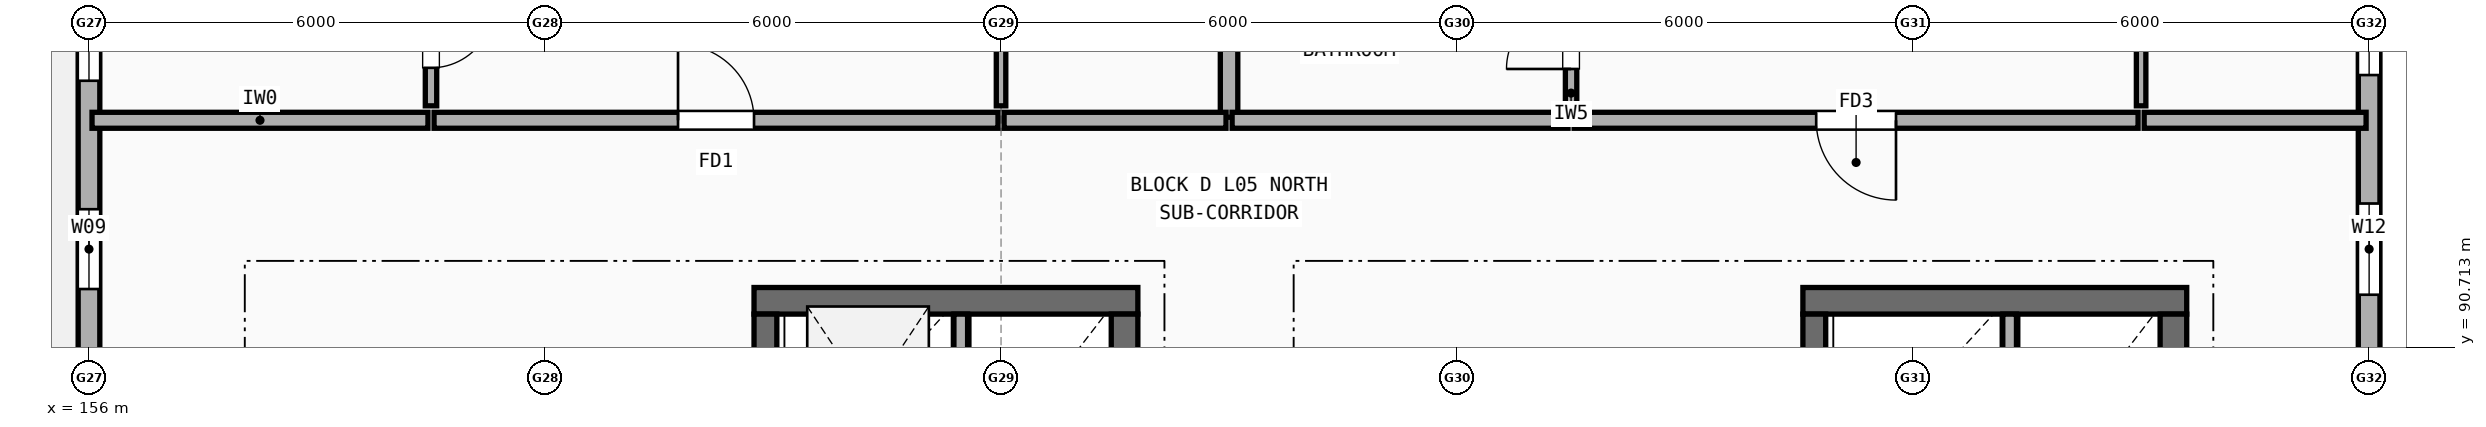
"""IFC4 building model, lengths in metres.
Left out: names, types, materials, properties, quantities, classifications, styles, units other than length and angle.
Written with IfcOpenShell. Run it as: python <this file> out.ifc"""

import sys

from ifc_helpers import new_model, si_unit, direction, frame, frame_2d, origin, place, context, subcontext, project, spatial, rectangle, extrude, element, fill, save


model = new_model("IFC4")
c1 = context("Model", 3, precision=1e-05, world=origin(), true_north=direction((0.0, 1.0)))
c2 = subcontext(c1, "Body", "Model", "MODEL_VIEW")
j1 = project(units=[si_unit("LENGTHUNIT", "METRE"), si_unit("PLANEANGLEUNIT", "RADIAN")], contexts=[c1])
p1 = place(None, origin())
s1 = spatial("IfcSite", under=j1, at=p1, CompositionType="ELEMENT")
p2 = place(p1, origin())
s2 = spatial("IfcBuilding", under=s1, at=p2, CompositionType="ELEMENT")
p3 = place(p2, frame((0.0, 0.0, 17.3)))
s3 = spatial("IfcBuildingStorey", under=s2, at=p3, CompositionType="ELEMENT", Elevation=17.3)
p4 = place(p3, frame((186.0, 90.35, 0.0), z_axis=(0.0, 0.0, 1.0), x_axis=(0.0, 1.0, 0.0)))
e1 = element("IfcWall", 1, at=p4, inside=s3, PredefinedType="STANDARD", context=c2, shape_type="SweptSolid", body=[
    extrude(rectangle(XDim=5.3, YDim=0.285, at=frame_2d((2.65, 0.0))), origin(), (0.0, 0.0, 1.0), 2.447),
])
p5 = place(p4, frame((1.055, 0.0, 0.9)))
e2 = element("IfcOpeningElement", 2, at=p5, cuts=e1, PredefinedType="OPENING", context=c2, shape_type="SweptSolid", body=[
    extrude(rectangle(XDim=1.2, YDim=1.35, at=frame_2d((0.6, 0.675))), frame((0.0, 0.152, 0.0), z_axis=(0.0, -1.0, 0.0), x_axis=(1.0, 0.0, 0.0)), (0.0, 0.0, 1.0), 0.305),
])
p6 = place(p4, frame((3.945, 0.0, 0.9)))
e3 = element("IfcOpeningElement", 3, at=p6, cuts=e1, PredefinedType="OPENING", context=c2, shape_type="SweptSolid", body=[
    extrude(rectangle(XDim=0.8, YDim=1.2, at=frame_2d((0.4, 0.6))), frame((0.0, 0.152, 0.0), z_axis=(0.0, -1.0, 0.0), x_axis=(1.0, 0.0, 0.0)), (0.0, 0.0, 1.0), 0.305),
])
p7 = place(p3, frame((156.0, 95.65, 0.0), z_axis=(0.0, 0.0, 1.0), x_axis=(0.0, -1.0, 0.0)))
e4 = element("IfcWall", 4, at=p7, inside=s3, PredefinedType="STANDARD", context=c2, shape_type="SweptSolid", body=[
    extrude(rectangle(XDim=5.3, YDim=0.285, at=frame_2d((2.65, 0.0))), origin(), (0.0, 0.0, 1.0), 2.447),
])
p8 = place(p7, frame((0.48, 0.0, 0.9)))
e5 = element("IfcOpeningElement", 5, at=p8, cuts=e4, PredefinedType="OPENING", context=c2, shape_type="SweptSolid", body=[
    extrude(rectangle(XDim=0.95, YDim=1.35, at=frame_2d((0.475, 0.675))), frame((0.0, 0.152, 0.0), z_axis=(0.0, -1.0, 0.0), x_axis=(1.0, 0.0, 0.0)), (0.0, 0.0, 1.0), 0.305),
])
p9 = place(p7, frame((3.12, 0.0, 0.9)))
e6 = element("IfcOpeningElement", 6, at=p9, cuts=e4, PredefinedType="OPENING", context=c2, shape_type="SweptSolid", body=[
    extrude(rectangle(XDim=1.05, YDim=1.35, at=frame_2d((0.525, 0.675))), frame((0.0, 0.152, 0.0), z_axis=(0.0, -1.0, 0.0), x_axis=(1.0, 0.0, 0.0)), (0.0, 0.0, 1.0), 0.305),
])
p10 = place(p3, frame((169.8, 91.325, 0.0), z_axis=(0.0, 0.0, 1.0), x_axis=(-1.0, 0.0, 0.0)))
e7 = element("IfcWall", 7, at=p10, inside=s3, PredefinedType="SHEAR", context=c2, shape_type="SweptSolid", body=[
    extrude(rectangle(XDim=5.05, YDim=0.35, at=frame_2d((2.525, 0.0))), origin(), (0.0, 0.0, 1.0), 2.965),
])
p11 = place(p3, frame((169.625, 84.75, 0.0), z_axis=(0.0, 0.0, 1.0), x_axis=(0.0, 1.0, 0.0)))
e8 = element("IfcWall", 8, at=p11, inside=s3, PredefinedType="SHEAR", context=c2, shape_type="SweptSolid", body=[
    extrude(rectangle(XDim=6.4, YDim=0.35, at=frame_2d((3.2, 0.0))), origin(), (0.0, 0.0, 1.0), 2.965),
])
p12 = place(p3, frame((164.9, 87.8, 0.0), z_axis=(0.0, 0.0, 1.0), x_axis=(0.0, 1.0, 0.0)))
e9 = element("IfcWall", 9, at=p12, inside=s3, PredefinedType="SHEAR", context=c2, shape_type="SweptSolid", body=[
    extrude(rectangle(XDim=3.35, YDim=0.3, at=frame_2d((1.675, 0.0))), origin(), (0.0, 0.0, 1.0), 2.965),
])
p13 = place(p3, frame((167.47, 88.94, 0.0), z_axis=(0.0, 0.0, 1.0), x_axis=(0.0, 1.0, 0.0)))
e10 = element("IfcWall", 10, at=p13, inside=s3, PredefinedType="SOLIDWALL", context=c2, shape_type="SweptSolid", body=[
    extrude(rectangle(XDim=2.21, YDim=0.18, at=frame_2d((1.105, 0.0))), origin(), (0.0, 0.0, 1.0), 2.965),
])
p14 = place(p3, frame((183.6, 91.325, 0.0), z_axis=(0.0, 0.0, 1.0), x_axis=(-1.0, 0.0, 0.0)))
e11 = element("IfcWall", 11, at=p14, inside=s3, PredefinedType="SHEAR", context=c2, shape_type="SweptSolid", body=[
    extrude(rectangle(XDim=5.05, YDim=0.35, at=frame_2d((2.525, 0.0))), origin(), (0.0, 0.0, 1.0), 2.965),
])
p15 = place(p3, frame((183.425, 84.75, 0.0), z_axis=(0.0, 0.0, 1.0), x_axis=(0.0, 1.0, 0.0)))
e12 = element("IfcWall", 12, at=p15, inside=s3, PredefinedType="SHEAR", context=c2, shape_type="SweptSolid", body=[
    extrude(rectangle(XDim=6.4, YDim=0.35, at=frame_2d((3.2, 0.0))), origin(), (0.0, 0.0, 1.0), 2.965),
])
p16 = place(p3, frame((178.7, 87.7, 0.0), z_axis=(0.0, 0.0, 1.0), x_axis=(0.0, 1.0, 0.0)))
e13 = element("IfcWall", 13, at=p16, inside=s3, PredefinedType="SHEAR", context=c2, shape_type="SweptSolid", body=[
    extrude(rectangle(XDim=3.45, YDim=0.3, at=frame_2d((1.725, 0.0))), origin(), (0.0, 0.0, 1.0), 2.965),
])
p17 = place(p3, frame((181.27, 88.94, 0.0), z_axis=(0.0, 0.0, 1.0), x_axis=(0.0, 1.0, 0.0)))
e14 = element("IfcWall", 14, at=p17, inside=s3, PredefinedType="SOLIDWALL", context=c2, shape_type="SweptSolid", body=[
    extrude(rectangle(XDim=2.21, YDim=0.18, at=frame_2d((1.105, 0.0))), origin(), (0.0, 0.0, 1.0), 2.965),
])
p18 = place(p3, frame((171.0, 93.74, 0.0), z_axis=(0.0, 0.0, 1.0), x_axis=(0.0, 1.0, 0.0)))
e15 = element("IfcWall", 15, at=p18, inside=s3, PredefinedType="SOLIDWALL", context=c2, shape_type="SweptSolid", body=[
    extrude(rectangle(XDim=7.87, YDim=0.23, at=frame_2d((3.935, 0.0))), origin(), (0.0, 0.0, 1.0), 2.508),
])
p19 = place(p3, frame((156.04, 93.7, 0.0), z_axis=(0.0, 0.0, 1.0), x_axis=(1.0, 0.0, 0.0)))
e16 = element("IfcWall", 16, at=p19, inside=s3, PredefinedType="SOLIDWALL", context=c2, shape_type="SweptSolid", body=[
    extrude(rectangle(XDim=4.42, YDim=0.21, at=frame_2d((2.21, 0.0))), origin(), (0.0, 0.0, 1.0), 2.447),
])
p20 = place(p3, frame((160.54, 93.7, 0.0), z_axis=(0.0, 0.0, 1.0), x_axis=(1.0, 0.0, 0.0)))
e17 = element("IfcWall", 17, at=p20, inside=s3, PredefinedType="SOLIDWALL", context=c2, shape_type="SweptSolid", body=[
    extrude(rectangle(XDim=7.42, YDim=0.21, at=frame_2d((3.71, 0.0))), origin(), (0.0, 0.0, 1.0), 2.508),
])
p21 = place(p20, frame((3.21, 0.0, 0.0)))
e18 = element("IfcOpeningElement", 18, at=p21, cuts=e17, PredefinedType="OPENING", context=c2, shape_type="SweptSolid", body=[
    extrude(rectangle(XDim=1.0, YDim=2.15, at=frame_2d((0.5, 1.075))), frame((0.0, 0.115, 0.0), z_axis=(0.0, -1.0, 0.0), x_axis=(1.0, 0.0, 0.0)), (0.0, 0.0, 1.0), 0.23),
])
p22 = place(p3, frame((160.5, 93.89, 0.0), z_axis=(0.0, 0.0, 1.0), x_axis=(0.0, 1.0, 0.0)))
e19 = element("IfcWall", 19, at=p22, inside=s3, PredefinedType="PARTITIONING", context=c2, shape_type="SweptSolid", body=[
    extrude(rectangle(XDim=1.82, YDim=0.15, at=frame_2d((0.91, 0.0))), origin(), (0.0, 0.0, 1.0), 2.965),
])
p23 = place(p22, frame((0.5, 0.0, 0.0)))
e20 = element("IfcOpeningElement", 20, at=p23, cuts=e19, PredefinedType="OPENING", context=c2, shape_type="SweptSolid", body=[
    extrude(rectangle(XDim=0.82, YDim=2.08, at=frame_2d((0.41, 1.04))), frame((0.0, 0.085, 0.0), z_axis=(0.0, -1.0, 0.0), x_axis=(1.0, 0.0, 0.0)), (0.0, 0.0, 1.0), 0.17),
])
p24 = place(p3, frame((168.04, 93.7, 0.0), z_axis=(0.0, 0.0, 1.0), x_axis=(1.0, 0.0, 0.0)))
e21 = element("IfcWall", 21, at=p24, inside=s3, PredefinedType="SOLIDWALL", context=c2, shape_type="SweptSolid", body=[
    extrude(rectangle(XDim=2.92, YDim=0.21, at=frame_2d((1.46, 0.0))), origin(), (0.0, 0.0, 1.0), 2.508),
])
p25 = place(p3, frame((168.0, 93.89, 0.0), z_axis=(0.0, 0.0, 1.0), x_axis=(0.0, 1.0, 0.0)))
e22 = element("IfcWall", 22, at=p25, inside=s3, PredefinedType="PARTITIONING", context=c2, shape_type="SweptSolid", body=[
    extrude(rectangle(XDim=7.6, YDim=0.125, at=frame_2d((3.8, 0.0))), origin(), (0.0, 0.0, 1.0), 2.458),
])
p26 = place(p25, frame((3.65, 0.0, 0.0)))
e23 = element("IfcOpeningElement", 23, at=p26, cuts=e22, PredefinedType="OPENING", context=c2, shape_type="SweptSolid", body=[
    extrude(rectangle(XDim=0.88, YDim=2.1, at=frame_2d((0.44, 1.05))), frame((0.0, 0.073, 0.0), z_axis=(0.0, -1.0, 0.0), x_axis=(1.0, 0.0, 0.0)), (0.0, 0.0, 1.0), 0.145),
])
p27 = place(p3, frame((171.04, 93.7, 0.0), z_axis=(0.0, 0.0, 1.0), x_axis=(1.0, 0.0, 0.0)))
e24 = element("IfcWall", 24, at=p27, inside=s3, PredefinedType="SOLIDWALL", context=c2, shape_type="SweptSolid", body=[
    extrude(rectangle(XDim=4.42, YDim=0.21, at=frame_2d((2.21, 0.0))), origin(), (0.0, 0.0, 1.0), 2.965),
])
p28 = place(p3, frame((175.54, 93.7, 0.0), z_axis=(0.0, 0.0, 1.0), x_axis=(1.0, 0.0, 0.0)))
e25 = element("IfcWall", 25, at=p28, inside=s3, PredefinedType="SOLIDWALL", context=c2, shape_type="SweptSolid", body=[
    extrude(rectangle(XDim=7.42, YDim=0.21, at=frame_2d((3.71, 0.0))), origin(), (0.0, 0.0, 1.0), 2.965),
])
p29 = place(p28, frame((3.185, 0.0, 0.0)))
e26 = element("IfcOpeningElement", 26, at=p29, cuts=e25, PredefinedType="OPENING", context=c2, shape_type="SweptSolid", body=[
    extrude(rectangle(XDim=1.05, YDim=2.15, at=frame_2d((0.525, 1.075))), frame((0.0, 0.115, 0.0), z_axis=(0.0, -1.0, 0.0), x_axis=(1.0, 0.0, 0.0)), (0.0, 0.0, 1.0), 0.23),
])
p30 = place(p3, frame((175.5, 93.89, 0.0), z_axis=(0.0, 0.0, 1.0), x_axis=(0.0, 1.0, 0.0)))
e27 = element("IfcWall", 27, at=p30, inside=s3, PredefinedType="PARTITIONING", context=c2, shape_type="SweptSolid", body=[
    extrude(rectangle(XDim=1.82, YDim=0.15, at=frame_2d((0.91, 0.0))), origin(), (0.0, 0.0, 1.0), 2.965),
])
p31 = place(p30, frame((0.485, 0.0, 0.0)))
e28 = element("IfcOpeningElement", 28, at=p31, cuts=e27, PredefinedType="OPENING", context=c2, shape_type="SweptSolid", body=[
    extrude(rectangle(XDim=0.85, YDim=2.1, at=frame_2d((0.425, 1.05))), frame((0.0, 0.085, 0.0), z_axis=(0.0, -1.0, 0.0), x_axis=(1.0, 0.0, 0.0)), (0.0, 0.0, 1.0), 0.17),
])
p32 = place(p3, frame((183.04, 93.7, 0.0), z_axis=(0.0, 0.0, 1.0), x_axis=(1.0, 0.0, 0.0)))
e29 = element("IfcWall", 29, at=p32, inside=s3, PredefinedType="SOLIDWALL", context=c2, shape_type="SweptSolid", body=[
    extrude(rectangle(XDim=2.92, YDim=0.21, at=frame_2d((1.46, 0.0))), origin(), (0.0, 0.0, 1.0), 2.447),
])
p33 = place(p3, frame((183.0, 93.89, 0.0), z_axis=(0.0, 0.0, 1.0), x_axis=(0.0, 1.0, 0.0)))
e30 = element("IfcWall", 30, at=p33, inside=s3, PredefinedType="PARTITIONING", context=c2, shape_type="SweptSolid", body=[
    extrude(rectangle(XDim=7.92, YDim=0.125, at=frame_2d((3.96, 0.0))), origin(), (0.0, 0.0, 1.0), 2.548),
])
p34 = place(p33, frame((3.65, 0.0, 0.0)))
e31 = element("IfcOpeningElement", 31, at=p34, cuts=e30, PredefinedType="OPENING", context=c2, shape_type="SweptSolid", body=[
    extrude(rectangle(XDim=0.9, YDim=2.1, at=frame_2d((0.45, 1.05))), frame((0.0, 0.073, 0.0), z_axis=(0.0, -1.0, 0.0), x_axis=(1.0, 0.0, 0.0)), (0.0, 0.0, 1.0), 0.145),
])
p35 = place(p5, origin())
e32 = element("IfcWindow", 32, at=p35, inside=s3, PartitioningType="SINGLE_PANEL", PredefinedType="WINDOW", context=c2, shape_type="SweptSolid", body=[
    extrude(rectangle(XDim=1.2, YDim=1.35, at=frame_2d((0.6, 0.675))), frame((0.0, 0.03, 0.0), z_axis=(0.0, -1.0, 0.0), x_axis=(1.0, 0.0, 0.0)), (0.0, 0.0, 1.0), 0.06),
])
fill(e2, e32)
p36 = place(p6, origin())
e33 = element("IfcWindow", 33, at=p36, inside=s3, PartitioningType="SINGLE_PANEL", PredefinedType="WINDOW", context=c2, shape_type="SweptSolid", body=[
    extrude(rectangle(XDim=0.8, YDim=1.2, at=frame_2d((0.4, 0.6))), frame((0.0, 0.03, 0.0), z_axis=(0.0, -1.0, 0.0), x_axis=(1.0, 0.0, 0.0)), (0.0, 0.0, 1.0), 0.06),
])
fill(e3, e33)
p37 = place(p8, origin())
e34 = element("IfcWindow", 34, at=p37, inside=s3, PartitioningType="SINGLE_PANEL", PredefinedType="WINDOW", context=c2, shape_type="SweptSolid", body=[
    extrude(rectangle(XDim=0.95, YDim=1.35, at=frame_2d((0.475, 0.675))), frame((0.0, 0.03, 0.0), z_axis=(0.0, -1.0, 0.0), x_axis=(1.0, 0.0, 0.0)), (0.0, 0.0, 1.0), 0.06),
])
fill(e5, e34)
p38 = place(p9, origin())
e35 = element("IfcWindow", 35, at=p38, inside=s3, PartitioningType="SINGLE_PANEL", PredefinedType="WINDOW", context=c2, shape_type="SweptSolid", body=[
    extrude(rectangle(XDim=1.05, YDim=1.35, at=frame_2d((0.525, 0.675))), frame((0.0, 0.03, 0.0), z_axis=(0.0, -1.0, 0.0), x_axis=(1.0, 0.0, 0.0)), (0.0, 0.0, 1.0), 0.06),
])
fill(e6, e35)
p39 = place(p21, origin())
e36 = element("IfcDoor", 36, at=p39, inside=s3, OperationType="SINGLE_SWING_LEFT", PredefinedType="DOOR", context=c2, shape_type="SweptSolid", body=[
    extrude(rectangle(XDim=1.0, YDim=2.15, at=frame_2d((0.5, 1.075))), frame((0.0, 0.025, 0.0), z_axis=(0.0, -1.0, 0.0), x_axis=(1.0, 0.0, 0.0)), (0.0, 0.0, 1.0), 0.05),
])
fill(e18, e36)
p40 = place(p23, origin())
e37 = element("IfcDoor", 37, at=p40, inside=s3, OperationType="SINGLE_SWING_RIGHT", PredefinedType="DOOR", context=c2, shape_type="SweptSolid", body=[
    extrude(rectangle(XDim=0.82, YDim=2.08, at=frame_2d((0.41, 1.04))), frame((0.0, 0.025, 0.0), z_axis=(0.0, -1.0, 0.0), x_axis=(1.0, 0.0, 0.0)), (0.0, 0.0, 1.0), 0.05),
])
fill(e20, e37)
p41 = place(p29, origin())
e38 = element("IfcDoor", 38, at=p41, inside=s3, OperationType="SINGLE_SWING_RIGHT", PredefinedType="DOOR", context=c2, shape_type="SweptSolid", body=[
    extrude(rectangle(XDim=1.05, YDim=2.15, at=frame_2d((0.525, 1.075))), frame((0.0, 0.025, 0.0), z_axis=(0.0, -1.0, 0.0), x_axis=(1.0, 0.0, 0.0)), (0.0, 0.0, 1.0), 0.05),
])
fill(e26, e38)
p42 = place(p31, origin())
e39 = element("IfcDoor", 39, at=p42, inside=s3, OperationType="SINGLE_SWING_LEFT", PredefinedType="DOOR", context=c2, shape_type="SweptSolid", body=[
    extrude(rectangle(XDim=0.85, YDim=2.1, at=frame_2d((0.425, 1.05))), frame((0.0, 0.025, 0.0), z_axis=(0.0, -1.0, 0.0), x_axis=(1.0, 0.0, 0.0)), (0.0, 0.0, 1.0), 0.05),
])
fill(e28, e39)
save(model, sys.argv[1])
